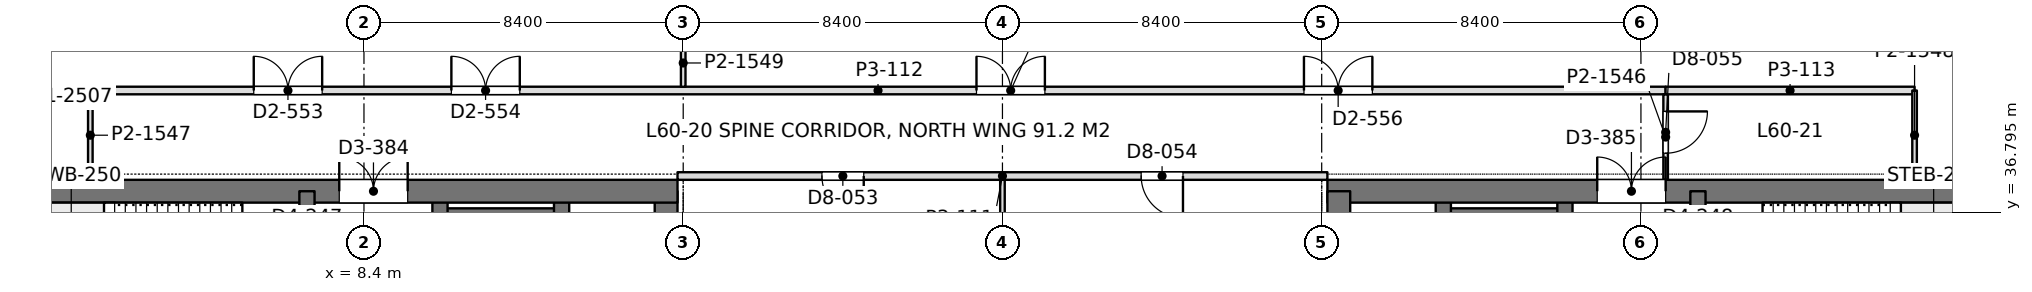
"""IFC4 building model, lengths in metres.
Left out: names, types, materials, properties, quantities, classifications, styles, units other than length and angle.
Written with IfcOpenShell. Run it as: python <this file> out.ifc"""

import sys

from ifc_helpers import new_model, si_unit, direction, frame, frame_2d, origin, place, context, subcontext, project, spatial, rectangle, extrude, element, fill, save


model = new_model("IFC4")
c1 = context("Model", 3, precision=1e-05, world=origin(), true_north=direction((0.0, 1.0)))
c2 = subcontext(c1, "Body", "Model", "MODEL_VIEW")
j1 = project(units=[si_unit("LENGTHUNIT", "METRE"), si_unit("PLANEANGLEUNIT", "RADIAN")], contexts=[c1])
p1 = place(None, origin())
s1 = spatial("IfcSite", under=j1, at=p1, CompositionType="ELEMENT")
p2 = place(p1, origin())
s2 = spatial("IfcBuilding", under=s1, at=p2, CompositionType="ELEMENT")
p3 = place(p2, frame((0.0, 0.0, 263.7)))
s3 = spatial("IfcBuildingStorey", under=s2, at=p3, CompositionType="ELEMENT", Elevation=263.7)
p4 = place(p3, frame((-1.05, 37.35, 0.0), z_axis=(0.0, 0.0, 1.0), x_axis=(1.0, 0.0, 0.0)))
e1 = element("IfcWall", 1, at=p4, inside=s3, PredefinedType="SHEAR", context=c2, shape_type="SweptSolid", body=[
    extrude(rectangle(XDim=17.7, YDim=0.6, at=frame_2d((8.85, 0.0))), origin(), (0.0, 0.0, 1.0), 4.5),
])
p5 = place(p4, frame((8.8, 0.0, 0.0)))
e2 = element("IfcOpeningElement", 2, at=p5, cuts=e1, PredefinedType="OPENING", context=c2, shape_type="SweptSolid", body=[
    extrude(rectangle(XDim=1.8, YDim=2.4, at=frame_2d((0.9, 1.2))), frame((0.0, 0.31, 0.0), z_axis=(0.0, -1.0, 0.0), x_axis=(1.0, 0.0, 0.0)), (0.0, 0.0, 1.0), 0.62),
])
p6 = place(p3, frame((16.35, 27.8, 0.0), z_axis=(0.0, 0.0, 1.0), x_axis=(0.0, 1.0, 0.0)))
e3 = element("IfcWall", 3, at=p6, inside=s3, PredefinedType="SHEAR", context=c2, shape_type="SweptSolid", body=[
    extrude(rectangle(XDim=9.55, YDim=0.6, at=frame_2d((4.775, 0.0))), origin(), (0.0, 0.0, 1.0), 4.5),
])
p7 = place(p3, frame((6.9, 13.05, 0.0), z_axis=(0.0, 0.0, 1.0), x_axis=(0.0, 1.0, 0.0)))
e4 = element("IfcWall", 4, at=p7, inside=s3, PredefinedType="SHEAR", context=c2, shape_type="SweptSolid", body=[
    extrude(rectangle(XDim=24.3, YDim=0.4, at=frame_2d((12.15, 0.0))), origin(), (0.0, 0.0, 1.0), 4.5),
])
p8 = place(p7, frame((1.3, 0.0, 0.0)))
e5 = element("IfcOpeningElement", 5, at=p8, cuts=e4, PredefinedType="OPENING", context=c2, shape_type="SweptSolid", body=[
    extrude(rectangle(XDim=1.0, YDim=2.2, at=frame_2d((0.5, 1.1))), frame((0.0, 0.21, 0.0), z_axis=(0.0, -1.0, 0.0), x_axis=(1.0, 0.0, 0.0)), (0.0, 0.0, 1.0), 0.42),
])
p9 = place(p7, frame((22.0, 0.0, 0.0)))
e6 = element("IfcOpeningElement", 6, at=p9, cuts=e4, PredefinedType="OPENING", context=c2, shape_type="SweptSolid", body=[
    extrude(rectangle(XDim=1.0, YDim=2.2, at=frame_2d((0.5, 1.1))), frame((0.0, 0.21, 0.0), z_axis=(0.0, -1.0, 0.0), x_axis=(1.0, 0.0, 0.0)), (0.0, 0.0, 1.0), 0.42),
])
p10 = place(p7, frame((5.55, 0.0, 0.0)))
e7 = element("IfcOpeningElement", 7, at=p10, cuts=e4, PredefinedType="OPENING", context=c2, shape_type="SweptSolid", body=[
    extrude(rectangle(XDim=1.0, YDim=2.2, at=frame_2d((0.5, 1.1))), frame((0.0, 0.21, 0.0), z_axis=(0.0, -1.0, 0.0), x_axis=(1.0, 0.0, 0.0)), (0.0, 0.0, 1.0), 0.42),
])
p11 = place(p7, frame((9.55, 0.0, 0.0)))
e8 = element("IfcOpeningElement", 8, at=p11, cuts=e4, PredefinedType="OPENING", context=c2, shape_type="SweptSolid", body=[
    extrude(rectangle(XDim=1.0, YDim=2.2, at=frame_2d((0.5, 1.1))), frame((0.0, 0.21, 0.0), z_axis=(0.0, -1.0, 0.0), x_axis=(1.0, 0.0, 0.0)), (0.0, 0.0, 1.0), 0.42),
])
p12 = place(p7, frame((12.8, 0.0, 0.0)))
e9 = element("IfcOpeningElement", 9, at=p12, cuts=e4, PredefinedType="OPENING", context=c2, shape_type="SweptSolid", body=[
    extrude(rectangle(XDim=1.1, YDim=2.2, at=frame_2d((0.55, 1.1))), frame((0.0, 0.21, 0.0), z_axis=(0.0, -1.0, 0.0), x_axis=(1.0, 0.0, 0.0)), (0.0, 0.0, 1.0), 0.42),
])
p13 = place(p7, frame((15.538, 0.0, 0.0)))
e10 = element("IfcOpeningElement", 10, at=p13, cuts=e4, PredefinedType="OPENING", context=c2, shape_type="SweptSolid", body=[
    extrude(rectangle(XDim=1.1, YDim=2.2, at=frame_2d((0.55, 1.1))), frame((0.0, 0.21, 0.0), z_axis=(0.0, -1.0, 0.0), x_axis=(1.0, 0.0, 0.0)), (0.0, 0.0, 1.0), 0.42),
])
p14 = place(p7, frame((18.262, 0.0, 0.0)))
e11 = element("IfcOpeningElement", 11, at=p14, cuts=e4, PredefinedType="OPENING", context=c2, shape_type="SweptSolid", body=[
    extrude(rectangle(XDim=1.1, YDim=2.2, at=frame_2d((0.55, 1.1))), frame((0.0, 0.21, 0.0), z_axis=(0.0, -1.0, 0.0), x_axis=(1.0, 0.0, 0.0)), (0.0, 0.0, 1.0), 0.42),
])
p15 = place(p3, frame((10.4, 13.05, 0.0), z_axis=(0.0, 0.0, 1.0), x_axis=(0.0, 1.0, 0.0)))
e12 = element("IfcWall", 12, at=p15, inside=s3, PredefinedType="SHEAR", context=c2, shape_type="SweptSolid", body=[
    extrude(rectangle(XDim=24.3, YDim=0.4, at=frame_2d((12.15, 0.0))), origin(), (0.0, 0.0, 1.0), 4.5),
])
p16 = place(p15, frame((15.75, 0.0, 0.0)))
e13 = element("IfcOpeningElement", 13, at=p16, cuts=e12, PredefinedType="OPENING", context=c2, shape_type="SweptSolid", body=[
    extrude(rectangle(XDim=1.1, YDim=2.2, at=frame_2d((0.55, 1.1))), frame((0.0, 0.21, 0.0), z_axis=(0.0, -1.0, 0.0), x_axis=(1.0, 0.0, 0.0)), (0.0, 0.0, 1.0), 0.42),
])
p17 = place(p15, frame((18.6, 0.0, 0.0)))
e14 = element("IfcOpeningElement", 14, at=p17, cuts=e12, PredefinedType="OPENING", context=c2, shape_type="SweptSolid", body=[
    extrude(rectangle(XDim=1.1, YDim=2.2, at=frame_2d((0.55, 1.1))), frame((0.0, 0.21, 0.0), z_axis=(0.0, -1.0, 0.0), x_axis=(1.0, 0.0, 0.0)), (0.0, 0.0, 1.0), 0.42),
])
p18 = place(p15, frame((21.45, 0.0, 0.0)))
e15 = element("IfcOpeningElement", 15, at=p18, cuts=e12, PredefinedType="OPENING", context=c2, shape_type="SweptSolid", body=[
    extrude(rectangle(XDim=1.1, YDim=2.2, at=frame_2d((0.55, 1.1))), frame((0.0, 0.21, 0.0), z_axis=(0.0, -1.0, 0.0), x_axis=(1.0, 0.0, 0.0)), (0.0, 0.0, 1.0), 0.42),
])
p19 = place(p15, frame((6.05, 0.0, 0.0)))
e16 = element("IfcOpeningElement", 16, at=p19, cuts=e12, PredefinedType="OPENING", context=c2, shape_type="SweptSolid", body=[
    extrude(rectangle(XDim=1.8, YDim=2.4, at=frame_2d((0.9, 1.2))), frame((0.0, 0.21, 0.0), z_axis=(0.0, -1.0, 0.0), x_axis=(1.0, 0.0, 0.0)), (0.0, 0.0, 1.0), 0.42),
])
p20 = place(p15, frame((11.25, 0.0, 0.0)))
e17 = element("IfcOpeningElement", 17, at=p20, cuts=e12, PredefinedType="OPENING", context=c2, shape_type="SweptSolid", body=[
    extrude(rectangle(XDim=1.8, YDim=2.4, at=frame_2d((0.9, 1.2))), frame((0.0, 0.21, 0.0), z_axis=(0.0, -1.0, 0.0), x_axis=(1.0, 0.0, 0.0)), (0.0, 0.0, 1.0), 0.42),
])
p21 = place(p3, frame((13.6, 27.925, 0.0), z_axis=(0.0, 0.0, 1.0), x_axis=(0.0, 1.0, 0.0)))
e18 = element("IfcWall", 18, at=p21, inside=s3, PredefinedType="SHEAR", context=c2, shape_type="SweptSolid", body=[
    extrude(rectangle(XDim=9.425, YDim=0.4, at=frame_2d((4.712, 0.0))), origin(), (0.0, 0.0, 1.0), 4.5),
])
p22 = place(p3, frame((10.4, 36.625, 0.0), z_axis=(0.0, 0.0, 1.0), x_axis=(1.0, 0.0, 0.0)))
e19 = element("IfcWall", 19, at=p22, inside=s3, PredefinedType="SHEAR", context=c2, shape_type="SweptSolid", body=[
    extrude(rectangle(XDim=3.2, YDim=0.55, at=frame_2d((1.6, 0.0))), origin(), (0.0, 0.0, 1.0), 4.5),
])
p23 = place(p3, frame((33.75, 37.35, 0.0), z_axis=(0.0, 0.0, 1.0), x_axis=(1.0, 0.0, 0.0)))
e20 = element("IfcWall", 20, at=p23, inside=s3, PredefinedType="SHEAR", context=c2, shape_type="SweptSolid", body=[
    extrude(rectangle(XDim=17.7, YDim=0.6, at=frame_2d((8.85, 0.0))), origin(), (0.0, 0.0, 1.0), 4.5),
])
p24 = place(p23, frame((7.1, 0.0, 0.0)))
e21 = element("IfcOpeningElement", 21, at=p24, cuts=e20, PredefinedType="OPENING", context=c2, shape_type="SweptSolid", body=[
    extrude(rectangle(XDim=1.8, YDim=2.4, at=frame_2d((0.9, 1.2))), frame((0.0, 0.31, 0.0), z_axis=(0.0, -1.0, 0.0), x_axis=(1.0, 0.0, 0.0)), (0.0, 0.0, 1.0), 0.62),
])
p25 = place(p3, frame((34.05, 27.8, 0.0), z_axis=(0.0, 0.0, 1.0), x_axis=(0.0, 1.0, 0.0)))
e22 = element("IfcWall", 22, at=p25, inside=s3, PredefinedType="SHEAR", context=c2, shape_type="SweptSolid", body=[
    extrude(rectangle(XDim=9.55, YDim=0.6, at=frame_2d((4.775, 0.0))), origin(), (0.0, 0.0, 1.0), 4.5),
])
p26 = place(p3, frame((43.5, 13.05, 0.0), z_axis=(0.0, 0.0, 1.0), x_axis=(0.0, 1.0, 0.0)))
e23 = element("IfcWall", 23, at=p26, inside=s3, PredefinedType="SHEAR", context=c2, shape_type="SweptSolid", body=[
    extrude(rectangle(XDim=24.3, YDim=0.4, at=frame_2d((12.15, 0.0))), origin(), (0.0, 0.0, 1.0), 4.5),
])
p27 = place(p26, frame((1.3, 0.0, 0.0)))
e24 = element("IfcOpeningElement", 24, at=p27, cuts=e23, PredefinedType="OPENING", context=c2, shape_type="SweptSolid", body=[
    extrude(rectangle(XDim=1.0, YDim=2.2, at=frame_2d((0.5, 1.1))), frame((0.0, 0.21, 0.0), z_axis=(0.0, -1.0, 0.0), x_axis=(1.0, 0.0, 0.0)), (0.0, 0.0, 1.0), 0.42),
])
p28 = place(p26, frame((22.0, 0.0, 0.0)))
e25 = element("IfcOpeningElement", 25, at=p28, cuts=e23, PredefinedType="OPENING", context=c2, shape_type="SweptSolid", body=[
    extrude(rectangle(XDim=1.0, YDim=2.2, at=frame_2d((0.5, 1.1))), frame((0.0, 0.21, 0.0), z_axis=(0.0, -1.0, 0.0), x_axis=(1.0, 0.0, 0.0)), (0.0, 0.0, 1.0), 0.42),
])
p29 = place(p26, frame((5.55, 0.0, 0.0)))
e26 = element("IfcOpeningElement", 26, at=p29, cuts=e23, PredefinedType="OPENING", context=c2, shape_type="SweptSolid", body=[
    extrude(rectangle(XDim=1.0, YDim=2.2, at=frame_2d((0.5, 1.1))), frame((0.0, 0.21, 0.0), z_axis=(0.0, -1.0, 0.0), x_axis=(1.0, 0.0, 0.0)), (0.0, 0.0, 1.0), 0.42),
])
p30 = place(p26, frame((9.55, 0.0, 0.0)))
e27 = element("IfcOpeningElement", 27, at=p30, cuts=e23, PredefinedType="OPENING", context=c2, shape_type="SweptSolid", body=[
    extrude(rectangle(XDim=1.0, YDim=2.2, at=frame_2d((0.5, 1.1))), frame((0.0, 0.21, 0.0), z_axis=(0.0, -1.0, 0.0), x_axis=(1.0, 0.0, 0.0)), (0.0, 0.0, 1.0), 0.42),
])
p31 = place(p26, frame((12.8, 0.0, 0.0)))
e28 = element("IfcOpeningElement", 28, at=p31, cuts=e23, PredefinedType="OPENING", context=c2, shape_type="SweptSolid", body=[
    extrude(rectangle(XDim=1.1, YDim=2.2, at=frame_2d((0.55, 1.1))), frame((0.0, 0.21, 0.0), z_axis=(0.0, -1.0, 0.0), x_axis=(1.0, 0.0, 0.0)), (0.0, 0.0, 1.0), 0.42),
])
p32 = place(p26, frame((15.538, 0.0, 0.0)))
e29 = element("IfcOpeningElement", 29, at=p32, cuts=e23, PredefinedType="OPENING", context=c2, shape_type="SweptSolid", body=[
    extrude(rectangle(XDim=1.1, YDim=2.2, at=frame_2d((0.55, 1.1))), frame((0.0, 0.21, 0.0), z_axis=(0.0, -1.0, 0.0), x_axis=(1.0, 0.0, 0.0)), (0.0, 0.0, 1.0), 0.42),
])
p33 = place(p26, frame((18.262, 0.0, 0.0)))
e30 = element("IfcOpeningElement", 30, at=p33, cuts=e23, PredefinedType="OPENING", context=c2, shape_type="SweptSolid", body=[
    extrude(rectangle(XDim=1.1, YDim=2.2, at=frame_2d((0.55, 1.1))), frame((0.0, 0.21, 0.0), z_axis=(0.0, -1.0, 0.0), x_axis=(1.0, 0.0, 0.0)), (0.0, 0.0, 1.0), 0.42),
])
p34 = place(p3, frame((40.0, 13.05, 0.0), z_axis=(0.0, 0.0, 1.0), x_axis=(0.0, 1.0, 0.0)))
e31 = element("IfcWall", 31, at=p34, inside=s3, PredefinedType="SHEAR", context=c2, shape_type="SweptSolid", body=[
    extrude(rectangle(XDim=24.3, YDim=0.4, at=frame_2d((12.15, 0.0))), origin(), (0.0, 0.0, 1.0), 4.5),
])
p35 = place(p34, frame((15.75, 0.0, 0.0)))
e32 = element("IfcOpeningElement", 32, at=p35, cuts=e31, PredefinedType="OPENING", context=c2, shape_type="SweptSolid", body=[
    extrude(rectangle(XDim=1.1, YDim=2.2, at=frame_2d((0.55, 1.1))), frame((0.0, 0.21, 0.0), z_axis=(0.0, -1.0, 0.0), x_axis=(1.0, 0.0, 0.0)), (0.0, 0.0, 1.0), 0.42),
])
p36 = place(p34, frame((18.6, 0.0, 0.0)))
e33 = element("IfcOpeningElement", 33, at=p36, cuts=e31, PredefinedType="OPENING", context=c2, shape_type="SweptSolid", body=[
    extrude(rectangle(XDim=1.1, YDim=2.2, at=frame_2d((0.55, 1.1))), frame((0.0, 0.21, 0.0), z_axis=(0.0, -1.0, 0.0), x_axis=(1.0, 0.0, 0.0)), (0.0, 0.0, 1.0), 0.42),
])
p37 = place(p34, frame((21.45, 0.0, 0.0)))
e34 = element("IfcOpeningElement", 34, at=p37, cuts=e31, PredefinedType="OPENING", context=c2, shape_type="SweptSolid", body=[
    extrude(rectangle(XDim=1.1, YDim=2.2, at=frame_2d((0.55, 1.1))), frame((0.0, 0.21, 0.0), z_axis=(0.0, -1.0, 0.0), x_axis=(1.0, 0.0, 0.0)), (0.0, 0.0, 1.0), 0.42),
])
p38 = place(p34, frame((6.05, 0.0, 0.0)))
e35 = element("IfcOpeningElement", 35, at=p38, cuts=e31, PredefinedType="OPENING", context=c2, shape_type="SweptSolid", body=[
    extrude(rectangle(XDim=1.8, YDim=2.4, at=frame_2d((0.9, 1.2))), frame((0.0, 0.21, 0.0), z_axis=(0.0, -1.0, 0.0), x_axis=(1.0, 0.0, 0.0)), (0.0, 0.0, 1.0), 0.42),
])
p39 = place(p34, frame((11.25, 0.0, 0.0)))
e36 = element("IfcOpeningElement", 36, at=p39, cuts=e31, PredefinedType="OPENING", context=c2, shape_type="SweptSolid", body=[
    extrude(rectangle(XDim=1.8, YDim=2.4, at=frame_2d((0.9, 1.2))), frame((0.0, 0.21, 0.0), z_axis=(0.0, -1.0, 0.0), x_axis=(1.0, 0.0, 0.0)), (0.0, 0.0, 1.0), 0.42),
])
p40 = place(p3, frame((36.8, 27.925, 0.0), z_axis=(0.0, 0.0, 1.0), x_axis=(0.0, 1.0, 0.0)))
e37 = element("IfcWall", 37, at=p40, inside=s3, PredefinedType="SHEAR", context=c2, shape_type="SweptSolid", body=[
    extrude(rectangle(XDim=9.425, YDim=0.4, at=frame_2d((4.712, 0.0))), origin(), (0.0, 0.0, 1.0), 4.5),
])
p41 = place(p3, frame((40.0, 36.625, 0.0), z_axis=(0.0, 0.0, 1.0), x_axis=(-1.0, 0.0, 0.0)))
e38 = element("IfcWall", 38, at=p41, inside=s3, PredefinedType="SHEAR", context=c2, shape_type="SweptSolid", body=[
    extrude(rectangle(XDim=3.2, YDim=0.55, at=frame_2d((1.6, 0.0))), origin(), (0.0, 0.0, 1.0), 4.5),
])
p42 = place(p3, frame((16.8, 40.098, 0.0), z_axis=(0.0, 0.0, 1.0), x_axis=(0.0, 1.0, 0.0)))
e39 = element("IfcWall", 39, at=p42, inside=s3, PredefinedType="PARTITIONING", context=c2, shape_type="SweptSolid", body=[
    extrude(rectangle(XDim=1.253, YDim=0.12, at=frame_2d((0.626, 0.0))), origin(), (0.0, 0.0, 1.0), 3.99),
])
p43 = place(p3, frame((1.2, 40.0, 0.0), z_axis=(0.0, 0.0, 1.0), x_axis=(1.0, 0.0, 0.0)))
e40 = element("IfcWall", 40, at=p43, inside=s3, PredefinedType="PARTITIONING", context=c2, shape_type="SweptSolid", body=[
    extrude(rectangle(XDim=41.452, YDim=0.2, at=frame_2d((20.726, 0.0))), origin(), (0.0, 0.0, 1.0), 3.8),
])
p44 = place(p43, frame((4.3, 0.0, 0.0)))
e41 = element("IfcOpeningElement", 41, at=p44, cuts=e40, PredefinedType="OPENING", context=c2, shape_type="SweptSolid", body=[
    extrude(rectangle(XDim=1.8, YDim=2.2, at=frame_2d((0.9, 1.1))), frame((0.0, 0.11, 0.0), z_axis=(0.0, -1.0, 0.0), x_axis=(1.0, 0.0, 0.0)), (0.0, 0.0, 1.0), 0.22),
])
p45 = place(p43, frame((9.5, 0.0, 0.0)))
e42 = element("IfcOpeningElement", 42, at=p45, cuts=e40, PredefinedType="OPENING", context=c2, shape_type="SweptSolid", body=[
    extrude(rectangle(XDim=1.8, YDim=2.2, at=frame_2d((0.9, 1.1))), frame((0.0, 0.11, 0.0), z_axis=(0.0, -1.0, 0.0), x_axis=(1.0, 0.0, 0.0)), (0.0, 0.0, 1.0), 0.22),
])
p46 = place(p43, frame((23.317, 0.0, 0.0)))
e43 = element("IfcOpeningElement", 43, at=p46, cuts=e40, PredefinedType="OPENING", context=c2, shape_type="SweptSolid", body=[
    extrude(rectangle(XDim=1.8, YDim=2.2, at=frame_2d((0.9, 1.1))), frame((0.0, 0.11, 0.0), z_axis=(0.0, -1.0, 0.0), x_axis=(1.0, 0.0, 0.0)), (0.0, 0.0, 1.0), 0.22),
])
p47 = place(p43, frame((31.933, 0.0, 0.0)))
e44 = element("IfcOpeningElement", 44, at=p47, cuts=e40, PredefinedType="OPENING", context=c2, shape_type="SweptSolid", body=[
    extrude(rectangle(XDim=1.8, YDim=2.2, at=frame_2d((0.9, 1.1))), frame((0.0, 0.11, 0.0), z_axis=(0.0, -1.0, 0.0), x_axis=(1.0, 0.0, 0.0)), (0.0, 0.0, 1.0), 0.22),
])
p48 = place(p3, frame((1.2, 37.648, 0.0), z_axis=(0.0, 0.0, 1.0), x_axis=(0.0, 1.0, 0.0)))
e45 = element("IfcWall", 45, at=p48, inside=s3, PredefinedType="PARTITIONING", context=c2, shape_type="SweptSolid", body=[
    extrude(rectangle(XDim=2.352, YDim=0.12, at=frame_2d((1.176, 0.0))), origin(), (0.0, 0.0, 1.0), 4.35),
])
p49 = place(p3, frame((42.65, 37.648, 0.0), z_axis=(0.0, 0.0, 1.0), x_axis=(0.0, 1.0, 0.0)))
e46 = element("IfcWall", 46, at=p49, inside=s3, PredefinedType="PARTITIONING", context=c2, shape_type="SweptSolid", body=[
    extrude(rectangle(XDim=2.254, YDim=0.12, at=frame_2d((1.127, 0.0))), origin(), (0.0, 0.0, 1.0), 4.35),
])
p50 = place(p49, frame((0.702, 0.0, 0.0)))
e47 = element("IfcOpeningElement", 47, at=p50, cuts=e46, PredefinedType="OPENING", context=c2, shape_type="SweptSolid", body=[
    extrude(rectangle(XDim=1.1, YDim=2.4, at=frame_2d((0.55, 1.2))), frame((0.0, 0.07, 0.0), z_axis=(0.0, -1.0, 0.0), x_axis=(1.0, 0.0, 0.0)), (0.0, 0.0, 1.0), 0.14),
])
p51 = place(p3, frame((42.648, 40.0, 0.0), z_axis=(0.0, 0.0, 1.0), x_axis=(1.0, 0.0, 0.0)))
e48 = element("IfcWall", 48, at=p51, inside=s3, PredefinedType="PARTITIONING", context=c2, shape_type="SweptSolid", body=[
    extrude(rectangle(XDim=6.552, YDim=0.2, at=frame_2d((3.276, 0.0))), origin(), (0.0, 0.0, 1.0), 3.99),
])
p52 = place(p3, frame((49.2, 37.648, 0.0), z_axis=(0.0, 0.0, 1.0), x_axis=(0.0, 1.0, 0.0)))
e49 = element("IfcWall", 49, at=p52, inside=s3, PredefinedType="PARTITIONING", context=c2, shape_type="SweptSolid", body=[
    extrude(rectangle(XDim=2.352, YDim=0.12, at=frame_2d((1.176, 0.0))), origin(), (0.0, 0.0, 1.0), 4.35),
])
p53 = place(p3, frame((25.2, 34.099, 0.0), z_axis=(0.0, 0.0, 1.0), x_axis=(0.0, 1.0, 0.0)))
e50 = element("IfcWall", 50, at=p53, inside=s3, PredefinedType="PARTITIONING", context=c2, shape_type="SweptSolid", body=[
    extrude(rectangle(XDim=3.603, YDim=0.12, at=frame_2d((1.801, 0.0))), origin(), (0.0, 0.0, 1.0), 3.8),
])
p54 = place(p3, frame((16.65, 37.75, 0.0), z_axis=(0.0, 0.0, 1.0), x_axis=(1.0, 0.0, 0.0)))
e51 = element("IfcWall", 51, at=p54, inside=s3, PredefinedType="PARTITIONING", context=c2, shape_type="SweptSolid", body=[
    extrude(rectangle(XDim=17.1, YDim=0.2, at=frame_2d((8.55, 0.0))), origin(), (0.0, 0.0, 1.0), 3.8),
])
p55 = place(p54, frame((3.8, 0.0, 0.0)))
e52 = element("IfcOpeningElement", 52, at=p55, cuts=e51, PredefinedType="OPENING", context=c2, shape_type="SweptSolid", body=[
    extrude(rectangle(XDim=1.1, YDim=2.4, at=frame_2d((0.55, 1.2))), frame((0.0, 0.11, 0.0), z_axis=(0.0, -1.0, 0.0), x_axis=(1.0, 0.0, 0.0)), (0.0, 0.0, 1.0), 0.22),
])
p56 = place(p54, frame((12.2, 0.0, 0.0)))
e53 = element("IfcOpeningElement", 53, at=p56, cuts=e51, PredefinedType="OPENING", context=c2, shape_type="SweptSolid", body=[
    extrude(rectangle(XDim=1.1, YDim=2.4, at=frame_2d((0.55, 1.2))), frame((0.0, 0.11, 0.0), z_axis=(0.0, -1.0, 0.0), x_axis=(1.0, 0.0, 0.0)), (0.0, 0.0, 1.0), 0.22),
])
p57 = place(p5, origin())
e54 = element("IfcDoor", 54, at=p57, inside=s3, OperationType="DOUBLE_DOOR_SINGLE_SWING", PredefinedType="DOOR", context=c2, shape_type="SweptSolid", body=[
    extrude(rectangle(XDim=1.8, YDim=2.4, at=frame_2d((0.9, 1.2))), frame((0.0, 0.025, 0.0), z_axis=(0.0, -1.0, 0.0), x_axis=(1.0, 0.0, 0.0)), (0.0, 0.0, 1.0), 0.05),
])
fill(e2, e54)
p58 = place(p24, origin())
e55 = element("IfcDoor", 55, at=p58, inside=s3, OperationType="DOUBLE_DOOR_SINGLE_SWING", PredefinedType="DOOR", context=c2, shape_type="SweptSolid", body=[
    extrude(rectangle(XDim=1.8, YDim=2.4, at=frame_2d((0.9, 1.2))), frame((0.0, 0.025, 0.0), z_axis=(0.0, -1.0, 0.0), x_axis=(1.0, 0.0, 0.0)), (0.0, 0.0, 1.0), 0.05),
])
fill(e21, e55)
p59 = place(p44, origin())
e56 = element("IfcDoor", 56, at=p59, inside=s3, OperationType="DOUBLE_DOOR_SINGLE_SWING", PredefinedType="DOOR", context=c2, shape_type="SweptSolid", body=[
    extrude(rectangle(XDim=1.8, YDim=2.2, at=frame_2d((0.9, 1.1))), frame((0.0, 0.025, 0.0), z_axis=(0.0, -1.0, 0.0), x_axis=(1.0, 0.0, 0.0)), (0.0, 0.0, 1.0), 0.05),
])
fill(e41, e56)
p60 = place(p45, origin())
e57 = element("IfcDoor", 57, at=p60, inside=s3, OperationType="DOUBLE_DOOR_SINGLE_SWING", PredefinedType="DOOR", context=c2, shape_type="SweptSolid", body=[
    extrude(rectangle(XDim=1.8, YDim=2.2, at=frame_2d((0.9, 1.1))), frame((0.0, 0.025, 0.0), z_axis=(0.0, -1.0, 0.0), x_axis=(1.0, 0.0, 0.0)), (0.0, 0.0, 1.0), 0.05),
])
fill(e42, e57)
p61 = place(p46, origin())
e58 = element("IfcDoor", 58, at=p61, inside=s3, OperationType="DOUBLE_DOOR_SINGLE_SWING", PredefinedType="DOOR", context=c2, shape_type="SweptSolid", body=[
    extrude(rectangle(XDim=1.8, YDim=2.2, at=frame_2d((0.9, 1.1))), frame((0.0, 0.025, 0.0), z_axis=(0.0, -1.0, 0.0), x_axis=(1.0, 0.0, 0.0)), (0.0, 0.0, 1.0), 0.05),
])
fill(e43, e58)
p62 = place(p47, origin())
e59 = element("IfcDoor", 59, at=p62, inside=s3, OperationType="DOUBLE_DOOR_SINGLE_SWING", PredefinedType="DOOR", context=c2, shape_type="SweptSolid", body=[
    extrude(rectangle(XDim=1.8, YDim=2.2, at=frame_2d((0.9, 1.1))), frame((0.0, 0.025, 0.0), z_axis=(0.0, -1.0, 0.0), x_axis=(1.0, 0.0, 0.0)), (0.0, 0.0, 1.0), 0.05),
])
fill(e44, e59)
p63 = place(p50, frame((1.1, 0.0, 0.0), z_axis=(0.0, 0.0, 1.0), x_axis=(-1.0, 0.0, 0.0)))
e60 = element("IfcDoor", 60, at=p63, inside=s3, OperationType="SINGLE_SWING_LEFT", PredefinedType="DOOR", context=c2, shape_type="SweptSolid", body=[
    extrude(rectangle(XDim=1.1, YDim=2.4, at=frame_2d((0.55, 1.2))), frame((0.0, 0.025, 0.0), z_axis=(0.0, -1.0, 0.0), x_axis=(1.0, 0.0, 0.0)), (0.0, 0.0, 1.0), 0.05),
])
fill(e47, e60)
p64 = place(p55, frame((1.1, 0.0, 0.0), z_axis=(0.0, 0.0, 1.0), x_axis=(-1.0, 0.0, 0.0)))
e61 = element("IfcDoor", 61, at=p64, inside=s3, OperationType="SINGLE_SWING_LEFT", PredefinedType="DOOR", context=c2, shape_type="SweptSolid", body=[
    extrude(rectangle(XDim=1.1, YDim=2.4, at=frame_2d((0.55, 1.2))), frame((0.0, 0.025, 0.0), z_axis=(0.0, -1.0, 0.0), x_axis=(1.0, 0.0, 0.0)), (0.0, 0.0, 1.0), 0.05),
])
fill(e52, e61)
p65 = place(p56, frame((1.1, 0.0, 0.0), z_axis=(0.0, 0.0, 1.0), x_axis=(-1.0, 0.0, 0.0)))
e62 = element("IfcDoor", 62, at=p65, inside=s3, OperationType="SINGLE_SWING_LEFT", PredefinedType="DOOR", context=c2, shape_type="SweptSolid", body=[
    extrude(rectangle(XDim=1.1, YDim=2.4, at=frame_2d((0.55, 1.2))), frame((0.0, 0.025, 0.0), z_axis=(0.0, -1.0, 0.0), x_axis=(1.0, 0.0, 0.0)), (0.0, 0.0, 1.0), 0.05),
])
fill(e53, e62)
save(model, sys.argv[1])
